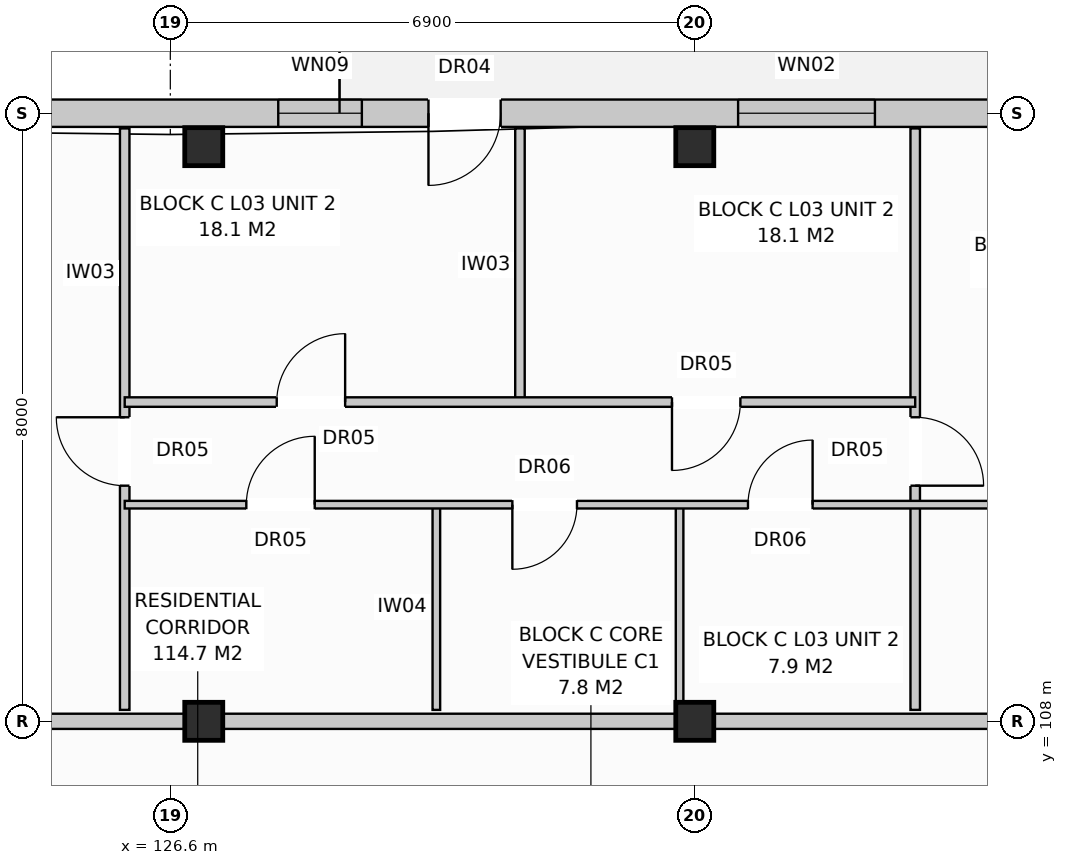
"""IFC4 building model, lengths in metres.
Left out: names, types, materials, properties, quantities, classifications, styles, units other than length and angle.
Written with IfcOpenShell. Run it as: python <this file> out.ifc"""

import sys

from ifc_helpers import new_model, si_unit, direction, frame, frame_2d, origin, origin_with_axes, origin_2d, place, context, subcontext, project, spatial, rectangle, extrude, element, fill, save


model = new_model("IFC4")
c1 = context("Model", 3, precision=1e-05, world=origin(), true_north=direction((0.0, 1.0)))
c2 = subcontext(c1, "Body", "Model", "MODEL_VIEW")
j1 = project(units=[si_unit("LENGTHUNIT", "METRE"), si_unit("PLANEANGLEUNIT", "RADIAN")], contexts=[c1])
p1 = place(None, origin())
s1 = spatial("IfcSite", under=j1, at=p1, CompositionType="ELEMENT")
p2 = place(p1, origin())
s2 = spatial("IfcBuilding", under=s1, at=p2, CompositionType="ELEMENT")
p3 = place(p2, frame((0.0, 0.0, 11.2)))
s3 = spatial("IfcBuildingStorey", under=s2, at=p3, CompositionType="ELEMENT", Elevation=11.2)
for number, where, z_axis, x_axis in (
    (1, (127.04, 108.0, 0.0), (0.0, 0.0, 1.0), (1.0, 0.0, 0.0)),
    (2, (127.04, 115.56, 0.0), (0.0, 0.0, 1.0), (1.0, 0.0, 0.0)),
    (3, (133.5, 108.0, 0.0), (0.0, 0.0, 1.0), (1.0, 0.0, 0.0)),
    (4, (133.5, 115.56, 0.0), (0.0, 0.0, 1.0), (1.0, 0.0, 0.0)),
):
    element("IfcColumn", number, at=place(p3, frame(where, z_axis=z_axis, x_axis=x_axis)), inside=s3, PredefinedType="COLUMN", context=c2, shape_type="SweptSolid", body=[
        extrude(rectangle(XDim=0.5, YDim=0.5, at=origin_2d()), origin(), (0.0, 0.0, 1.0), 3.2),
    ])
p4 = place(p3, frame((112.97, 116.0, 0.0), z_axis=(0.0, 0.0, 1.0), x_axis=(1.0, 0.0, 0.0)))
e5 = element("IfcWall", 5, at=p4, inside=s3, PredefinedType="STANDARD", context=c2, shape_type="SweptSolid", body=[
    extrude(rectangle(XDim=54.86, YDim=0.36, at=frame_2d((27.43, 0.0))), origin(), (0.0, 0.0, 1.0), 2.94),
])
p5 = place(p4, frame((2.497, 0.0, 0.0)))
e6 = element("IfcOpeningElement", 6, at=p5, cuts=e5, PredefinedType="OPENING", context=c2, shape_type="SweptSolid", body=[
    extrude(rectangle(XDim=0.95, YDim=2.1, at=frame_2d((0.475, 1.05))), frame((0.0, 0.192, 0.0), z_axis=(0.0, -1.0, 0.0), x_axis=(1.0, 0.0, 0.0)), (0.0, 0.0, 1.0), 0.384),
])
p6 = place(p4, frame((17.026, 0.0, 0.0)))
e7 = element("IfcOpeningElement", 7, at=p6, cuts=e5, PredefinedType="OPENING", context=c2, shape_type="SweptSolid", body=[
    extrude(rectangle(XDim=0.95, YDim=2.1, at=frame_2d((0.475, 1.05))), frame((0.0, 0.192, 0.0), z_axis=(0.0, -1.0, 0.0), x_axis=(1.0, 0.0, 0.0)), (0.0, 0.0, 1.0), 0.384),
])
p7 = place(p4, frame((30.126, 0.0, 0.0)))
e8 = element("IfcOpeningElement", 8, at=p7, cuts=e5, PredefinedType="OPENING", context=c2, shape_type="SweptSolid", body=[
    extrude(rectangle(XDim=0.95, YDim=2.1, at=frame_2d((0.475, 1.05))), frame((0.0, 0.192, 0.0), z_axis=(0.0, -1.0, 0.0), x_axis=(1.0, 0.0, 0.0)), (0.0, 0.0, 1.0), 0.384),
])
p8 = place(p4, frame((44.226, 0.0, 0.0)))
e9 = element("IfcOpeningElement", 9, at=p8, cuts=e5, PredefinedType="OPENING", context=c2, shape_type="SweptSolid", body=[
    extrude(rectangle(XDim=0.95, YDim=2.1, at=frame_2d((0.475, 1.05))), frame((0.0, 0.192, 0.0), z_axis=(0.0, -1.0, 0.0), x_axis=(1.0, 0.0, 0.0)), (0.0, 0.0, 1.0), 0.384),
])
p9 = place(p4, frame((0.645, 0.0, 0.85)))
e10 = element("IfcOpeningElement", 10, at=p9, cuts=e5, PredefinedType="OPENING", context=c2, shape_type="SweptSolid", body=[
    extrude(rectangle(XDim=1.55, YDim=1.55, at=frame_2d((0.775, 0.775))), frame((0.0, 0.192, 0.0), z_axis=(0.0, -1.0, 0.0), x_axis=(1.0, 0.0, 0.0)), (0.0, 0.0, 1.0), 0.384),
])
p10 = place(p4, frame((4.3, 0.0, 0.8)))
e11 = element("IfcOpeningElement", 11, at=p10, cuts=e5, PredefinedType="OPENING", context=c2, shape_type="SweptSolid", body=[
    extrude(rectangle(XDim=1.8, YDim=1.7, at=frame_2d((0.9, 0.85))), frame((0.0, 0.192, 0.0), z_axis=(0.0, -1.0, 0.0), x_axis=(1.0, 0.0, 0.0)), (0.0, 0.0, 1.0), 0.384),
])
p11 = place(p4, frame((9.35, 0.0, 0.72)))
e12 = element("IfcOpeningElement", 12, at=p11, cuts=e5, PredefinedType="OPENING", context=c2, shape_type="SweptSolid", body=[
    extrude(rectangle(XDim=1.1, YDim=1.5, at=frame_2d((0.55, 0.75))), frame((0.0, 0.192, 0.0), z_axis=(0.0, -1.0, 0.0), x_axis=(1.0, 0.0, 0.0)), (0.0, 0.0, 1.0), 0.384),
])
p12 = place(p4, frame((15.05, 0.0, 0.72)))
e13 = element("IfcOpeningElement", 13, at=p12, cuts=e5, PredefinedType="OPENING", context=c2, shape_type="SweptSolid", body=[
    extrude(rectangle(XDim=1.1, YDim=1.5, at=frame_2d((0.55, 0.75))), frame((0.0, 0.192, 0.0), z_axis=(0.0, -1.0, 0.0), x_axis=(1.0, 0.0, 0.0)), (0.0, 0.0, 1.0), 0.384),
])
p13 = place(p4, frame((21.1, 0.0, 0.8)))
e14 = element("IfcOpeningElement", 14, at=p13, cuts=e5, PredefinedType="OPENING", context=c2, shape_type="SweptSolid", body=[
    extrude(rectangle(XDim=1.8, YDim=1.7, at=frame_2d((0.9, 0.85))), frame((0.0, 0.192, 0.0), z_axis=(0.0, -1.0, 0.0), x_axis=(1.0, 0.0, 0.0)), (0.0, 0.0, 1.0), 0.384),
])
p14 = place(p4, frame((24.85, 0.0, 0.72)))
e15 = element("IfcOpeningElement", 15, at=p14, cuts=e5, PredefinedType="OPENING", context=c2, shape_type="SweptSolid", body=[
    extrude(rectangle(XDim=1.1, YDim=1.5, at=frame_2d((0.55, 0.75))), frame((0.0, 0.192, 0.0), z_axis=(0.0, -1.0, 0.0), x_axis=(1.0, 0.0, 0.0)), (0.0, 0.0, 1.0), 0.384),
])
p15 = place(p4, frame((28.35, 0.0, 0.72)))
e16 = element("IfcOpeningElement", 16, at=p15, cuts=e5, PredefinedType="OPENING", context=c2, shape_type="SweptSolid", body=[
    extrude(rectangle(XDim=1.1, YDim=1.5, at=frame_2d((0.55, 0.75))), frame((0.0, 0.192, 0.0), z_axis=(0.0, -1.0, 0.0), x_axis=(1.0, 0.0, 0.0)), (0.0, 0.0, 1.0), 0.384),
])
p16 = place(p4, frame((31.9, 0.0, 0.8)))
e17 = element("IfcOpeningElement", 17, at=p16, cuts=e5, PredefinedType="OPENING", context=c2, shape_type="SweptSolid", body=[
    extrude(rectangle(XDim=1.8, YDim=1.7, at=frame_2d((0.9, 0.85))), frame((0.0, 0.192, 0.0), z_axis=(0.0, -1.0, 0.0), x_axis=(1.0, 0.0, 0.0)), (0.0, 0.0, 1.0), 0.384),
])
p17 = place(p4, frame((35.55, 0.0, 0.72)))
e18 = element("IfcOpeningElement", 18, at=p17, cuts=e5, PredefinedType="OPENING", context=c2, shape_type="SweptSolid", body=[
    extrude(rectangle(XDim=1.9, YDim=1.85, at=frame_2d((0.95, 0.925))), frame((0.0, 0.192, 0.0), z_axis=(0.0, -1.0, 0.0), x_axis=(1.0, 0.0, 0.0)), (0.0, 0.0, 1.0), 0.384),
])
p18 = place(p4, frame((39.25, 0.0, 0.72)))
e19 = element("IfcOpeningElement", 19, at=p18, cuts=e5, PredefinedType="OPENING", context=c2, shape_type="SweptSolid", body=[
    extrude(rectangle(XDim=1.1, YDim=1.5, at=frame_2d((0.55, 0.75))), frame((0.0, 0.192, 0.0), z_axis=(0.0, -1.0, 0.0), x_axis=(1.0, 0.0, 0.0)), (0.0, 0.0, 1.0), 0.384),
])
p19 = place(p4, frame((42.45, 0.0, 0.72)))
e20 = element("IfcOpeningElement", 20, at=p19, cuts=e5, PredefinedType="OPENING", context=c2, shape_type="SweptSolid", body=[
    extrude(rectangle(XDim=1.1, YDim=1.5, at=frame_2d((0.55, 0.75))), frame((0.0, 0.192, 0.0), z_axis=(0.0, -1.0, 0.0), x_axis=(1.0, 0.0, 0.0)), (0.0, 0.0, 1.0), 0.384),
])
p20 = place(p4, frame((45.75, 0.0, 0.72)))
e21 = element("IfcOpeningElement", 21, at=p20, cuts=e5, PredefinedType="OPENING", context=c2, shape_type="SweptSolid", body=[
    extrude(rectangle(XDim=1.9, YDim=1.85, at=frame_2d((0.95, 0.925))), frame((0.0, 0.192, 0.0), z_axis=(0.0, -1.0, 0.0), x_axis=(1.0, 0.0, 0.0)), (0.0, 0.0, 1.0), 0.384),
])
p21 = place(p4, frame((51.85, 0.0, 0.72)))
e22 = element("IfcOpeningElement", 22, at=p21, cuts=e5, PredefinedType="OPENING", context=c2, shape_type="SweptSolid", body=[
    extrude(rectangle(XDim=1.1, YDim=1.5, at=frame_2d((0.55, 0.75))), frame((0.0, 0.192, 0.0), z_axis=(0.0, -1.0, 0.0), x_axis=(1.0, 0.0, 0.0)), (0.0, 0.0, 1.0), 0.384),
])
p22 = place(p3, frame((119.7, 108.0, 0.0), z_axis=(0.0, 0.0, 1.0), x_axis=(1.0, 0.0, 0.0)))
e23 = element("IfcWall", 23, at=p22, inside=s3, PredefinedType="PARTITIONING", context=c2, shape_type="SweptSolid", body=[
    extrude(rectangle(XDim=20.7, YDim=0.2, at=frame_2d((10.35, 0.0))), origin(), (0.0, 0.0, 1.0), 2.38),
])
p23 = place(p22, frame((2.4, 0.0, 0.0)))
e24 = element("IfcOpeningElement", 24, at=p23, cuts=e23, PredefinedType="OPENING", context=c2, shape_type="SweptSolid", body=[
    extrude(rectangle(XDim=0.95, YDim=2.15, at=frame_2d((0.475, 1.075))), frame((0.0, 0.112, 0.0), z_axis=(0.0, -1.0, 0.0), x_axis=(1.0, 0.0, 0.0)), (0.0, 0.0, 1.0), 0.224),
])
p24 = place(p3, frame((126.0, 108.15, 0.0), z_axis=(0.0, 0.0, 1.0), x_axis=(0.0, 1.0, 0.0)))
e25 = element("IfcWall", 25, at=p24, inside=s3, PredefinedType="PARTITIONING", context=c2, shape_type="SweptSolid", body=[
    extrude(rectangle(XDim=7.65, YDim=0.125, at=frame_2d((3.825, 0.0))), origin(), (0.0, 0.0, 1.0), 2.94),
])
p25 = place(p24, frame((2.95, 0.0, 0.0)))
e26 = element("IfcOpeningElement", 26, at=p25, cuts=e25, PredefinedType="OPENING", context=c2, shape_type="SweptSolid", body=[
    extrude(rectangle(XDim=0.9, YDim=2.1, at=frame_2d((0.45, 1.05))), frame((0.0, 0.074, 0.0), z_axis=(0.0, -1.0, 0.0), x_axis=(1.0, 0.0, 0.0)), (0.0, 0.0, 1.0), 0.149),
])
for number, where, z_axis, x_axis in (
    (27, (130.1, 108.15, 0.0), (0.0, 0.0, 1.0), (0.0, 1.0, 0.0)),
    (28, (133.3, 108.15, 0.0), (0.0, 0.0, 1.0), (0.0, 1.0, 0.0)),
):
    element("IfcWall", number, at=place(p3, frame(where, z_axis=z_axis, x_axis=x_axis)), inside=s3, PredefinedType="PARTITIONING", context=c2, shape_type="SweptSolid", body=[
        extrude(rectangle(XDim=2.7, YDim=0.1, at=frame_2d((1.35, 0.0))), origin(), (0.0, 0.0, 1.0), 2.94),
    ])
p26 = place(p3, frame((131.2, 112.2, 0.0), z_axis=(0.0, 0.0, 1.0), x_axis=(0.0, 1.0, 0.0)))
e29 = element("IfcWall", 29, at=p26, inside=s3, PredefinedType="PARTITIONING", context=c2, shape_type="SweptSolid", body=[
    extrude(rectangle(XDim=3.6, YDim=0.125, at=frame_2d((1.8, 0.0))), origin(), (0.0, 0.0, 1.0), 2.94),
])
p27 = place(p3, frame((136.4, 108.15, 0.0), z_axis=(0.0, 0.0, 1.0), x_axis=(0.0, 1.0, 0.0)))
e30 = element("IfcWall", 30, at=p27, inside=s3, PredefinedType="PARTITIONING", context=c2, shape_type="SweptSolid", body=[
    extrude(rectangle(XDim=7.65, YDim=0.125, at=frame_2d((3.825, 0.0))), origin(), (0.0, 0.0, 1.0), 2.94),
])
p28 = place(p27, frame((2.95, 0.0, 0.0)))
e31 = element("IfcOpeningElement", 31, at=p28, cuts=e30, PredefinedType="OPENING", context=c2, shape_type="SweptSolid", body=[
    extrude(rectangle(XDim=0.9, YDim=2.1, at=frame_2d((0.45, 1.05))), frame((0.0, 0.074, 0.0), z_axis=(0.0, -1.0, 0.0), x_axis=(1.0, 0.0, 0.0)), (0.0, 0.0, 1.0), 0.149),
])
p29 = place(p3, frame((126.0, 110.85, 0.0), z_axis=(0.0, 0.0, 1.0), x_axis=(1.0, 0.0, 0.0)))
e32 = element("IfcWall", 32, at=p29, inside=s3, PredefinedType="PARTITIONING", context=c2, shape_type="SweptSolid", body=[
    extrude(rectangle(XDim=14.3, YDim=0.1, at=frame_2d((7.15, 0.0))), origin(), (0.0, 0.0, 1.0), 2.94),
])
p30 = place(p29, frame((1.6, 0.0, 0.0)))
e33 = element("IfcOpeningElement", 33, at=p30, cuts=e32, PredefinedType="OPENING", context=c2, shape_type="SweptSolid", body=[
    extrude(rectangle(XDim=0.9, YDim=2.1, at=frame_2d((0.45, 1.05))), frame((0.0, 0.062, 0.0), z_axis=(0.0, -1.0, 0.0), x_axis=(1.0, 0.0, 0.0)), (0.0, 0.0, 1.0), 0.124),
])
p31 = place(p29, frame((5.1, 0.0, 0.0)))
e34 = element("IfcOpeningElement", 34, at=p31, cuts=e32, PredefinedType="OPENING", context=c2, shape_type="SweptSolid", body=[
    extrude(rectangle(XDim=0.85, YDim=2.05, at=frame_2d((0.425, 1.025))), frame((0.0, 0.062, 0.0), z_axis=(0.0, -1.0, 0.0), x_axis=(1.0, 0.0, 0.0)), (0.0, 0.0, 1.0), 0.124),
])
p32 = place(p29, frame((8.2, 0.0, 0.0)))
e35 = element("IfcOpeningElement", 35, at=p32, cuts=e32, PredefinedType="OPENING", context=c2, shape_type="SweptSolid", body=[
    extrude(rectangle(XDim=0.85, YDim=2.05, at=frame_2d((0.425, 1.025))), frame((0.0, 0.062, 0.0), z_axis=(0.0, -1.0, 0.0), x_axis=(1.0, 0.0, 0.0)), (0.0, 0.0, 1.0), 0.124),
])
p33 = place(p29, frame((11.6, 0.0, 0.0)))
e36 = element("IfcOpeningElement", 36, at=p33, cuts=e32, PredefinedType="OPENING", context=c2, shape_type="SweptSolid", body=[
    extrude(rectangle(XDim=0.85, YDim=2.05, at=frame_2d((0.425, 1.025))), frame((0.0, 0.062, 0.0), z_axis=(0.0, -1.0, 0.0), x_axis=(1.0, 0.0, 0.0)), (0.0, 0.0, 1.0), 0.124),
])
p34 = place(p3, frame((126.0, 112.2, 0.0), z_axis=(0.0, 0.0, 1.0), x_axis=(1.0, 0.0, 0.0)))
e37 = element("IfcWall", 37, at=p34, inside=s3, PredefinedType="PARTITIONING", context=c2, shape_type="SweptSolid", body=[
    extrude(rectangle(XDim=10.4, YDim=0.125, at=frame_2d((5.2, 0.0))), origin(), (0.0, 0.0, 1.0), 2.94),
])
p35 = place(p34, frame((2.0, 0.0, 0.0)))
e38 = element("IfcOpeningElement", 38, at=p35, cuts=e37, PredefinedType="OPENING", context=c2, shape_type="SweptSolid", body=[
    extrude(rectangle(XDim=0.9, YDim=2.1, at=frame_2d((0.45, 1.05))), frame((0.0, 0.074, 0.0), z_axis=(0.0, -1.0, 0.0), x_axis=(1.0, 0.0, 0.0)), (0.0, 0.0, 1.0), 0.149),
])
p36 = place(p34, frame((7.2, 0.0, 0.0)))
e39 = element("IfcOpeningElement", 39, at=p36, cuts=e37, PredefinedType="OPENING", context=c2, shape_type="SweptSolid", body=[
    extrude(rectangle(XDim=0.9, YDim=2.1, at=frame_2d((0.45, 1.05))), frame((0.0, 0.074, 0.0), z_axis=(0.0, -1.0, 0.0), x_axis=(1.0, 0.0, 0.0)), (0.0, 0.0, 1.0), 0.149),
])
p37 = place(p6, frame((0.95, 0.0, 0.0), z_axis=(0.0, 0.0, 1.0), x_axis=(-1.0, 0.0, 0.0)))
e40 = element("IfcDoor", 40, at=p37, inside=s3, OperationType="SINGLE_SWING_LEFT", PredefinedType="DOOR", context=c2, shape_type="SweptSolid", body=[
    extrude(rectangle(XDim=0.95, YDim=2.1, at=frame_2d((0.475, 1.05))), frame((0.0, 0.025, 0.0), z_axis=(0.0, -1.0, 0.0), x_axis=(1.0, 0.0, 0.0)), (0.0, 0.0, 1.0), 0.05),
])
fill(e7, e40)
p38 = place(p12, origin_with_axes())
e41 = element("IfcWindow", 41, at=p38, inside=s3, PartitioningType="SINGLE_PANEL", PredefinedType="WINDOW", context=c2, shape_type="SweptSolid", body=[
    extrude(rectangle(XDim=1.1, YDim=1.5, at=frame_2d((0.55, 0.75))), frame((0.0, 0.03, 0.0), z_axis=(0.0, -1.0, 0.0), x_axis=(1.0, 0.0, 0.0)), (0.0, 0.0, 1.0), 0.06),
])
fill(e13, e41)
p39 = place(p13, origin_with_axes())
e42 = element("IfcWindow", 42, at=p39, inside=s3, PartitioningType="SINGLE_PANEL", PredefinedType="WINDOW", context=c2, shape_type="SweptSolid", body=[
    extrude(rectangle(XDim=1.8, YDim=1.7, at=frame_2d((0.9, 0.85))), frame((0.0, 0.03, 0.0), z_axis=(0.0, -1.0, 0.0), x_axis=(1.0, 0.0, 0.0)), (0.0, 0.0, 1.0), 0.06),
])
fill(e14, e42)
p40 = place(p25, origin_with_axes())
e43 = element("IfcDoor", 43, at=p40, inside=s3, OperationType="SINGLE_SWING_RIGHT", PredefinedType="DOOR", context=c2, shape_type="SweptSolid", body=[
    extrude(rectangle(XDim=0.9, YDim=2.1, at=frame_2d((0.45, 1.05))), frame((0.0, 0.025, 0.0), z_axis=(0.0, -1.0, 0.0), x_axis=(1.0, 0.0, 0.0)), (0.0, 0.0, 1.0), 0.05),
])
fill(e26, e43)
p41 = place(p28, frame((0.9, 0.0, 0.0), z_axis=(0.0, 0.0, 1.0), x_axis=(-1.0, 0.0, 0.0)))
e44 = element("IfcDoor", 44, at=p41, inside=s3, OperationType="SINGLE_SWING_LEFT", PredefinedType="DOOR", context=c2, shape_type="SweptSolid", body=[
    extrude(rectangle(XDim=0.9, YDim=2.1, at=frame_2d((0.45, 1.05))), frame((0.0, 0.025, 0.0), z_axis=(0.0, -1.0, 0.0), x_axis=(1.0, 0.0, 0.0)), (0.0, 0.0, 1.0), 0.05),
])
fill(e31, e44)
p42 = place(p30, origin_with_axes())
e45 = element("IfcDoor", 45, at=p42, inside=s3, OperationType="SINGLE_SWING_RIGHT", PredefinedType="DOOR", context=c2, shape_type="SweptSolid", body=[
    extrude(rectangle(XDim=0.9, YDim=2.1, at=frame_2d((0.45, 1.05))), frame((0.0, 0.025, 0.0), z_axis=(0.0, -1.0, 0.0), x_axis=(1.0, 0.0, 0.0)), (0.0, 0.0, 1.0), 0.05),
])
fill(e33, e45)
p43 = place(p31, frame((0.85, 0.0, 0.0), z_axis=(0.0, 0.0, 1.0), x_axis=(-1.0, 0.0, 0.0)))
e46 = element("IfcDoor", 46, at=p43, inside=s3, OperationType="SINGLE_SWING_LEFT", PredefinedType="DOOR", context=c2, shape_type="SweptSolid", body=[
    extrude(rectangle(XDim=0.85, YDim=2.05, at=frame_2d((0.425, 1.025))), frame((0.0, 0.025, 0.0), z_axis=(0.0, -1.0, 0.0), x_axis=(1.0, 0.0, 0.0)), (0.0, 0.0, 1.0), 0.05),
])
fill(e34, e46)
p44 = place(p32, origin_with_axes())
e47 = element("IfcDoor", 47, at=p44, inside=s3, OperationType="SINGLE_SWING_RIGHT", PredefinedType="DOOR", context=c2, shape_type="SweptSolid", body=[
    extrude(rectangle(XDim=0.85, YDim=2.05, at=frame_2d((0.425, 1.025))), frame((0.0, 0.025, 0.0), z_axis=(0.0, -1.0, 0.0), x_axis=(1.0, 0.0, 0.0)), (0.0, 0.0, 1.0), 0.05),
])
fill(e35, e47)
p45 = place(p35, origin_with_axes())
e48 = element("IfcDoor", 48, at=p45, inside=s3, OperationType="SINGLE_SWING_RIGHT", PredefinedType="DOOR", context=c2, shape_type="SweptSolid", body=[
    extrude(rectangle(XDim=0.9, YDim=2.1, at=frame_2d((0.45, 1.05))), frame((0.0, 0.025, 0.0), z_axis=(0.0, -1.0, 0.0), x_axis=(1.0, 0.0, 0.0)), (0.0, 0.0, 1.0), 0.05),
])
fill(e38, e48)
p46 = place(p36, frame((0.9, 0.0, 0.0), z_axis=(0.0, 0.0, 1.0), x_axis=(-1.0, 0.0, 0.0)))
e49 = element("IfcDoor", 49, at=p46, inside=s3, OperationType="SINGLE_SWING_LEFT", PredefinedType="DOOR", context=c2, shape_type="SweptSolid", body=[
    extrude(rectangle(XDim=0.9, YDim=2.1, at=frame_2d((0.45, 1.05))), frame((0.0, 0.025, 0.0), z_axis=(0.0, -1.0, 0.0), x_axis=(1.0, 0.0, 0.0)), (0.0, 0.0, 1.0), 0.05),
])
fill(e39, e49)
save(model, sys.argv[1])
